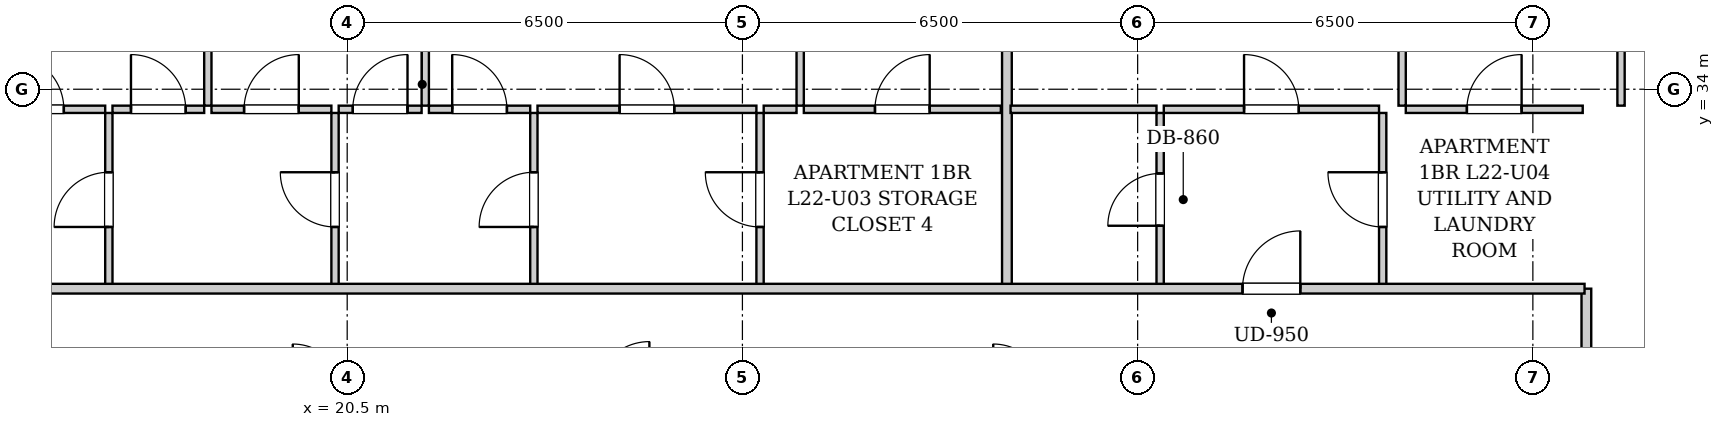
"""IFC4 building model, lengths in metres.
Left out: names, types, materials, properties, quantities, classifications, styles, units other than length and angle.
Written with IfcOpenShell. Run it as: python <this file> out.ifc"""

import sys

from ifc_helpers import new_model, si_unit, direction, frame, frame_2d, origin, place, context, subcontext, project, spatial, rectangle, extrude, element, fill, save


model = new_model("IFC4")
c1 = context("Model", 3, precision=1e-05, world=origin(), true_north=direction((0.0, 1.0)))
c2 = subcontext(c1, "Body", "Model", "MODEL_VIEW")
j1 = project(units=[si_unit("LENGTHUNIT", "METRE"), si_unit("PLANEANGLEUNIT", "RADIAN")], contexts=[c1])
p1 = place(None, origin())
s1 = spatial("IfcSite", under=j1, at=p1, CompositionType="ELEMENT")
p2 = place(p1, origin())
s2 = spatial("IfcBuilding", under=s1, at=p2, CompositionType="ELEMENT")
p3 = place(p2, frame((0.0, 0.0, 81.5)))
s3 = spatial("IfcBuildingStorey", under=s2, at=p3, CompositionType="ELEMENT", Elevation=81.5)
p4 = place(p3, frame((40.88, 28.98, 0.0), z_axis=(0.0, 0.0, 1.0), x_axis=(0.0, 1.0, 0.0)))
e1 = element("IfcWall", 1, at=p4, inside=s3, PredefinedType="PARTITIONING", context=c2, shape_type="SweptSolid", body=[
    extrude(rectangle(XDim=1.74, YDim=0.16, at=frame_2d((0.87, 0.0))), origin(), (0.0, 0.0, 1.0), 2.94),
])
p5 = place(p3, frame((16.58, 30.76, 0.0), z_axis=(0.0, 0.0, 1.0), x_axis=(0.0, 1.0, 0.0)))
e2 = element("IfcWall", 2, at=p5, inside=s3, PredefinedType="PARTITIONING", context=c2, shape_type="SweptSolid", body=[
    extrude(rectangle(XDim=2.85, YDim=0.12, at=frame_2d((1.425, 0.0))), origin(), (0.0, 0.0, 1.0), 2.94),
])
p6 = place(p5, frame((0.975, 0.0, 0.0)))
e3 = element("IfcOpeningElement", 3, at=p6, cuts=e2, PredefinedType="OPENING", context=c2, shape_type="SweptSolid", body=[
    extrude(rectangle(XDim=0.9, YDim=2.05, at=frame_2d((0.45, 1.025))), frame((0.0, 0.07, 0.0), z_axis=(0.0, -1.0, 0.0), x_axis=(1.0, 0.0, 0.0)), (0.0, 0.0, 1.0), 0.14),
])
p7 = place(p3, frame((14.26, 33.67, 0.0), z_axis=(0.0, 0.0, 1.0), x_axis=(1.0, 0.0, 0.0)))
e4 = element("IfcWall", 4, at=p7, inside=s3, PredefinedType="PARTITIONING", context=c2, shape_type="SweptSolid", body=[
    extrude(rectangle(XDim=2.26, YDim=0.12, at=frame_2d((1.13, 0.0))), origin(), (0.0, 0.0, 1.0), 2.94),
])
p8 = place(p7, frame((0.68, 0.0, 0.0)))
e5 = element("IfcOpeningElement", 5, at=p8, cuts=e4, PredefinedType="OPENING", context=c2, shape_type="SweptSolid", body=[
    extrude(rectangle(XDim=0.9, YDim=2.05, at=frame_2d((0.45, 1.025))), frame((0.0, 0.07, 0.0), z_axis=(0.0, -1.0, 0.0), x_axis=(1.0, 0.0, 0.0)), (0.0, 0.0, 1.0), 0.14),
])
p9 = place(p3, frame((20.3, 30.76, 0.0), z_axis=(0.0, 0.0, 1.0), x_axis=(0.0, 1.0, 0.0)))
e6 = element("IfcWall", 6, at=p9, inside=s3, PredefinedType="PARTITIONING", context=c2, shape_type="SweptSolid", body=[
    extrude(rectangle(XDim=2.85, YDim=0.12, at=frame_2d((1.425, 0.0))), origin(), (0.0, 0.0, 1.0), 2.94),
])
p10 = place(p9, frame((0.975, 0.0, 0.0)))
e7 = element("IfcOpeningElement", 7, at=p10, cuts=e6, PredefinedType="OPENING", context=c2, shape_type="SweptSolid", body=[
    extrude(rectangle(XDim=0.9, YDim=2.05, at=frame_2d((0.45, 1.025))), frame((0.0, 0.07, 0.0), z_axis=(0.0, -1.0, 0.0), x_axis=(1.0, 0.0, 0.0)), (0.0, 0.0, 1.0), 0.14),
])
p11 = place(p3, frame((16.64, 33.67, 0.0), z_axis=(0.0, 0.0, 1.0), x_axis=(1.0, 0.0, 0.0)))
e8 = element("IfcWall", 8, at=p11, inside=s3, PredefinedType="PARTITIONING", context=c2, shape_type="SweptSolid", body=[
    extrude(rectangle(XDim=1.508, YDim=0.12, at=frame_2d((0.754, 0.0))), origin(), (0.0, 0.0, 1.0), 2.94),
])
p12 = place(p11, frame((0.304, 0.0, 0.0)))
e9 = element("IfcOpeningElement", 9, at=p12, cuts=e8, PredefinedType="OPENING", context=c2, shape_type="SweptSolid", body=[
    extrude(rectangle(XDim=0.9, YDim=2.05, at=frame_2d((0.45, 1.025))), frame((0.0, 0.07, 0.0), z_axis=(0.0, -1.0, 0.0), x_axis=(1.0, 0.0, 0.0)), (0.0, 0.0, 1.0), 0.14),
])
p13 = place(p3, frame((18.268, 33.67, 0.0), z_axis=(0.0, 0.0, 1.0), x_axis=(1.0, 0.0, 0.0)))
e10 = element("IfcWall", 10, at=p13, inside=s3, PredefinedType="PARTITIONING", context=c2, shape_type="SweptSolid", body=[
    extrude(rectangle(XDim=1.972, YDim=0.12, at=frame_2d((0.986, 0.0))), origin(), (0.0, 0.0, 1.0), 2.94),
])
p14 = place(p13, frame((0.536, 0.0, 0.0)))
e11 = element("IfcOpeningElement", 11, at=p14, cuts=e10, PredefinedType="OPENING", context=c2, shape_type="SweptSolid", body=[
    extrude(rectangle(XDim=0.9, YDim=2.05, at=frame_2d((0.45, 1.025))), frame((0.0, 0.07, 0.0), z_axis=(0.0, -1.0, 0.0), x_axis=(1.0, 0.0, 0.0)), (0.0, 0.0, 1.0), 0.14),
])
p15 = place(p3, frame((23.57, 30.76, 0.0), z_axis=(0.0, 0.0, 1.0), x_axis=(0.0, 1.0, 0.0)))
e12 = element("IfcWall", 12, at=p15, inside=s3, PredefinedType="PARTITIONING", context=c2, shape_type="SweptSolid", body=[
    extrude(rectangle(XDim=2.85, YDim=0.12, at=frame_2d((1.425, 0.0))), origin(), (0.0, 0.0, 1.0), 2.94),
])
p16 = place(p15, frame((0.975, 0.0, 0.0)))
e13 = element("IfcOpeningElement", 13, at=p16, cuts=e12, PredefinedType="OPENING", context=c2, shape_type="SweptSolid", body=[
    extrude(rectangle(XDim=0.9, YDim=2.05, at=frame_2d((0.45, 1.025))), frame((0.0, 0.07, 0.0), z_axis=(0.0, -1.0, 0.0), x_axis=(1.0, 0.0, 0.0)), (0.0, 0.0, 1.0), 0.14),
])
p17 = place(p3, frame((20.36, 33.67, 0.0), z_axis=(0.0, 0.0, 1.0), x_axis=(1.0, 0.0, 0.0)))
e14 = element("IfcWall", 14, at=p17, inside=s3, PredefinedType="PARTITIONING", context=c2, shape_type="SweptSolid", body=[
    extrude(rectangle(XDim=1.364, YDim=0.12, at=frame_2d((0.682, 0.0))), origin(), (0.0, 0.0, 1.0), 2.94),
])
p18 = place(p17, frame((0.232, 0.0, 0.0)))
e15 = element("IfcOpeningElement", 15, at=p18, cuts=e14, PredefinedType="OPENING", context=c2, shape_type="SweptSolid", body=[
    extrude(rectangle(XDim=0.9, YDim=2.05, at=frame_2d((0.45, 1.025))), frame((0.0, 0.07, 0.0), z_axis=(0.0, -1.0, 0.0), x_axis=(1.0, 0.0, 0.0)), (0.0, 0.0, 1.0), 0.14),
])
p19 = place(p3, frame((21.844, 33.67, 0.0), z_axis=(0.0, 0.0, 1.0), x_axis=(1.0, 0.0, 0.0)))
e16 = element("IfcWall", 16, at=p19, inside=s3, PredefinedType="PARTITIONING", context=c2, shape_type="SweptSolid", body=[
    extrude(rectangle(XDim=1.666, YDim=0.12, at=frame_2d((0.833, 0.0))), origin(), (0.0, 0.0, 1.0), 2.94),
])
p20 = place(p19, frame((0.383, 0.0, 0.0)))
e17 = element("IfcOpeningElement", 17, at=p20, cuts=e16, PredefinedType="OPENING", context=c2, shape_type="SweptSolid", body=[
    extrude(rectangle(XDim=0.9, YDim=2.05, at=frame_2d((0.45, 1.025))), frame((0.0, 0.07, 0.0), z_axis=(0.0, -1.0, 0.0), x_axis=(1.0, 0.0, 0.0)), (0.0, 0.0, 1.0), 0.14),
])
p21 = place(p3, frame((27.29, 30.76, 0.0), z_axis=(0.0, 0.0, 1.0), x_axis=(0.0, 1.0, 0.0)))
e18 = element("IfcWall", 18, at=p21, inside=s3, PredefinedType="PARTITIONING", context=c2, shape_type="SweptSolid", body=[
    extrude(rectangle(XDim=2.85, YDim=0.12, at=frame_2d((1.425, 0.0))), origin(), (0.0, 0.0, 1.0), 2.94),
])
p22 = place(p21, frame((0.975, 0.0, 0.0)))
e19 = element("IfcOpeningElement", 19, at=p22, cuts=e18, PredefinedType="OPENING", context=c2, shape_type="SweptSolid", body=[
    extrude(rectangle(XDim=0.9, YDim=2.05, at=frame_2d((0.45, 1.025))), frame((0.0, 0.07, 0.0), z_axis=(0.0, -1.0, 0.0), x_axis=(1.0, 0.0, 0.0)), (0.0, 0.0, 1.0), 0.14),
])
p23 = place(p3, frame((23.63, 33.67, 0.0), z_axis=(0.0, 0.0, 1.0), x_axis=(1.0, 0.0, 0.0)))
e20 = element("IfcWall", 20, at=p23, inside=s3, PredefinedType="PARTITIONING", context=c2, shape_type="SweptSolid", body=[
    extrude(rectangle(XDim=3.6, YDim=0.12, at=frame_2d((1.8, 0.0))), origin(), (0.0, 0.0, 1.0), 2.94),
])
p24 = place(p23, frame((1.35, 0.0, 0.0)))
e21 = element("IfcOpeningElement", 21, at=p24, cuts=e20, PredefinedType="OPENING", context=c2, shape_type="SweptSolid", body=[
    extrude(rectangle(XDim=0.9, YDim=2.05, at=frame_2d((0.45, 1.025))), frame((0.0, 0.07, 0.0), z_axis=(0.0, -1.0, 0.0), x_axis=(1.0, 0.0, 0.0)), (0.0, 0.0, 1.0), 0.14),
])
p25 = place(p3, frame((27.35, 33.67, 0.0), z_axis=(0.0, 0.0, 1.0), x_axis=(1.0, 0.0, 0.0)))
e22 = element("IfcWall", 22, at=p25, inside=s3, PredefinedType="PARTITIONING", context=c2, shape_type="SweptSolid", body=[
    extrude(rectangle(XDim=0.54, YDim=0.12, at=frame_2d((0.27, 0.0))), origin(), (0.0, 0.0, 1.0), 2.94),
])
p26 = place(p3, frame((28.01, 33.67, 0.0), z_axis=(0.0, 0.0, 1.0), x_axis=(1.0, 0.0, 0.0)))
e23 = element("IfcWall", 23, at=p26, inside=s3, PredefinedType="PARTITIONING", context=c2, shape_type="SweptSolid", body=[
    extrude(rectangle(XDim=3.24, YDim=0.12, at=frame_2d((1.62, 0.0))), origin(), (0.0, 0.0, 1.0), 2.94),
])
p27 = place(p26, frame((1.17, 0.0, 0.0)))
e24 = element("IfcOpeningElement", 24, at=p27, cuts=e23, PredefinedType="OPENING", context=c2, shape_type="SweptSolid", body=[
    extrude(rectangle(XDim=0.9, YDim=2.05, at=frame_2d((0.45, 1.025))), frame((0.0, 0.07, 0.0), z_axis=(0.0, -1.0, 0.0), x_axis=(1.0, 0.0, 0.0)), (0.0, 0.0, 1.0), 0.14),
])
p28 = place(p3, frame((18.208, 33.73, 0.0), z_axis=(0.0, 0.0, 1.0), x_axis=(0.0, 1.0, 0.0)))
e25 = element("IfcWall", 25, at=p28, inside=s3, PredefinedType="PARTITIONING", context=c2, shape_type="SweptSolid", body=[
    extrude(rectangle(XDim=9.29, YDim=0.12, at=frame_2d((4.645, 0.0))), origin(), (0.0, 0.0, 1.0), 2.94),
])
p29 = place(p28, frame((4.18, 0.0, 0.0)))
e26 = element("IfcOpeningElement", 26, at=p29, cuts=e25, PredefinedType="OPENING", context=c2, shape_type="SweptSolid", body=[
    extrude(rectangle(XDim=0.9, YDim=2.05, at=frame_2d((0.45, 1.025))), frame((0.0, 0.07, 0.0), z_axis=(0.0, -1.0, 0.0), x_axis=(1.0, 0.0, 0.0)), (0.0, 0.0, 1.0), 0.14),
])
p30 = place(p3, frame((21.784, 33.73, 0.0), z_axis=(0.0, 0.0, 1.0), x_axis=(0.0, 1.0, 0.0)))
e27 = element("IfcWall", 27, at=p30, inside=s3, PredefinedType="PARTITIONING", context=c2, shape_type="SweptSolid", body=[
    extrude(rectangle(XDim=9.29, YDim=0.12, at=frame_2d((4.645, 0.0))), origin(), (0.0, 0.0, 1.0), 2.94),
])
p31 = place(p30, frame((4.18, 0.0, 0.0)))
e28 = element("IfcOpeningElement", 28, at=p31, cuts=e27, PredefinedType="OPENING", context=c2, shape_type="SweptSolid", body=[
    extrude(rectangle(XDim=0.9, YDim=2.05, at=frame_2d((0.45, 1.025))), frame((0.0, 0.07, 0.0), z_axis=(0.0, -1.0, 0.0), x_axis=(1.0, 0.0, 0.0)), (0.0, 0.0, 1.0), 0.14),
])
p32 = place(p3, frame((27.95, 33.73, 0.0), z_axis=(0.0, 0.0, 1.0), x_axis=(0.0, 1.0, 0.0)))
e29 = element("IfcWall", 29, at=p32, inside=s3, PredefinedType="PARTITIONING", context=c2, shape_type="SweptSolid", body=[
    extrude(rectangle(XDim=9.29, YDim=0.12, at=frame_2d((4.645, 0.0))), origin(), (0.0, 0.0, 1.0), 2.94),
])
p33 = place(p32, frame((4.18, 0.0, 0.0)))
e30 = element("IfcOpeningElement", 30, at=p33, cuts=e29, PredefinedType="OPENING", context=c2, shape_type="SweptSolid", body=[
    extrude(rectangle(XDim=0.9, YDim=2.05, at=frame_2d((0.45, 1.025))), frame((0.0, 0.07, 0.0), z_axis=(0.0, -1.0, 0.0), x_axis=(1.0, 0.0, 0.0)), (0.0, 0.0, 1.0), 0.14),
])
p34 = place(p3, frame((31.35, 30.76, 0.0), z_axis=(0.0, 0.0, 1.0), x_axis=(0.0, 1.0, 0.0)))
e31 = element("IfcWall", 31, at=p34, inside=s3, PredefinedType="PARTITIONING", context=c2, shape_type="SweptSolid", body=[
    extrude(rectangle(XDim=12.26, YDim=0.16, at=frame_2d((6.13, 0.0))), origin(), (0.0, 0.0, 1.0), 2.94),
])
p35 = place(p3, frame((33.87, 30.76, 0.0), z_axis=(0.0, 0.0, 1.0), x_axis=(0.0, 1.0, 0.0)))
e32 = element("IfcWall", 32, at=p35, inside=s3, PredefinedType="PARTITIONING", context=c2, shape_type="SweptSolid", body=[
    extrude(rectangle(XDim=2.85, YDim=0.12, at=frame_2d((1.425, 0.0))), origin(), (0.0, 0.0, 1.0), 2.94),
])
p36 = place(p35, frame((0.995, 0.0, 0.0)))
e33 = element("IfcOpeningElement", 33, at=p36, cuts=e32, PredefinedType="OPENING", context=c2, shape_type="SweptSolid", body=[
    extrude(rectangle(XDim=0.86, YDim=2.05, at=frame_2d((0.43, 1.025))), frame((0.0, 0.07, 0.0), z_axis=(0.0, -1.0, 0.0), x_axis=(1.0, 0.0, 0.0)), (0.0, 0.0, 1.0), 0.14),
])
p37 = place(p3, frame((31.41, 33.67, 0.0), z_axis=(0.0, 0.0, 1.0), x_axis=(1.0, 0.0, 0.0)))
e34 = element("IfcWall", 34, at=p37, inside=s3, PredefinedType="PARTITIONING", context=c2, shape_type="SweptSolid", body=[
    extrude(rectangle(XDim=2.4, YDim=0.12, at=frame_2d((1.2, 0.0))), origin(), (0.0, 0.0, 1.0), 2.94),
])
p38 = place(p3, frame((37.53, 30.76, 0.0), z_axis=(0.0, 0.0, 1.0), x_axis=(0.0, 1.0, 0.0)))
e35 = element("IfcWall", 35, at=p38, inside=s3, PredefinedType="PARTITIONING", context=c2, shape_type="SweptSolid", body=[
    extrude(rectangle(XDim=2.85, YDim=0.12, at=frame_2d((1.425, 0.0))), origin(), (0.0, 0.0, 1.0), 2.94),
])
p39 = place(p38, frame((0.975, 0.0, 0.0)))
e36 = element("IfcOpeningElement", 36, at=p39, cuts=e35, PredefinedType="OPENING", context=c2, shape_type="SweptSolid", body=[
    extrude(rectangle(XDim=0.9, YDim=2.05, at=frame_2d((0.45, 1.025))), frame((0.0, 0.07, 0.0), z_axis=(0.0, -1.0, 0.0), x_axis=(1.0, 0.0, 0.0)), (0.0, 0.0, 1.0), 0.14),
])
p40 = place(p3, frame((33.93, 33.67, 0.0), z_axis=(0.0, 0.0, 1.0), x_axis=(1.0, 0.0, 0.0)))
e37 = element("IfcWall", 37, at=p40, inside=s3, PredefinedType="PARTITIONING", context=c2, shape_type="SweptSolid", body=[
    extrude(rectangle(XDim=3.54, YDim=0.12, at=frame_2d((1.77, 0.0))), origin(), (0.0, 0.0, 1.0), 2.94),
])
p41 = place(p40, frame((1.32, 0.0, 0.0)))
e38 = element("IfcOpeningElement", 38, at=p41, cuts=e37, PredefinedType="OPENING", context=c2, shape_type="SweptSolid", body=[
    extrude(rectangle(XDim=0.9, YDim=2.05, at=frame_2d((0.45, 1.025))), frame((0.0, 0.07, 0.0), z_axis=(0.0, -1.0, 0.0), x_axis=(1.0, 0.0, 0.0)), (0.0, 0.0, 1.0), 0.14),
])
p42 = place(p3, frame((37.91, 33.67, 0.0), z_axis=(0.0, 0.0, 1.0), x_axis=(1.0, 0.0, 0.0)))
e39 = element("IfcWall", 39, at=p42, inside=s3, PredefinedType="PARTITIONING", context=c2, shape_type="SweptSolid", body=[
    extrude(rectangle(XDim=2.91, YDim=0.12, at=frame_2d((1.455, 0.0))), origin(), (0.0, 0.0, 1.0), 2.94),
])
p43 = place(p42, frame((1.005, 0.0, 0.0)))
e40 = element("IfcOpeningElement", 40, at=p43, cuts=e39, PredefinedType="OPENING", context=c2, shape_type="SweptSolid", body=[
    extrude(rectangle(XDim=0.9, YDim=2.05, at=frame_2d((0.45, 1.025))), frame((0.0, 0.07, 0.0), z_axis=(0.0, -1.0, 0.0), x_axis=(1.0, 0.0, 0.0)), (0.0, 0.0, 1.0), 0.14),
])
p44 = place(p3, frame((37.85, 33.73, 0.0), z_axis=(0.0, 0.0, 1.0), x_axis=(0.0, 1.0, 0.0)))
e41 = element("IfcWall", 41, at=p44, inside=s3, PredefinedType="PARTITIONING", context=c2, shape_type="SweptSolid", body=[
    extrude(rectangle(XDim=7.14, YDim=0.12, at=frame_2d((3.57, 0.0))), origin(), (0.0, 0.0, 1.0), 2.94),
])
p45 = place(p44, frame((3.12, 0.0, 0.0)))
e42 = element("IfcOpeningElement", 42, at=p45, cuts=e41, PredefinedType="OPENING", context=c2, shape_type="SweptSolid", body=[
    extrude(rectangle(XDim=0.9, YDim=2.05, at=frame_2d((0.45, 1.025))), frame((0.0, 0.07, 0.0), z_axis=(0.0, -1.0, 0.0), x_axis=(1.0, 0.0, 0.0)), (0.0, 0.0, 1.0), 0.14),
])
p46 = place(p3, frame((41.45, 33.73, 0.0), z_axis=(0.0, 0.0, 1.0), x_axis=(0.0, 1.0, 0.0)))
e43 = element("IfcWall", 43, at=p46, inside=s3, PredefinedType="PARTITIONING", context=c2, shape_type="SweptSolid", body=[
    extrude(rectangle(XDim=7.14, YDim=0.12, at=frame_2d((3.57, 0.0))), origin(), (0.0, 0.0, 1.0), 2.94),
])
p47 = place(p46, frame((3.075, 0.0, 0.0)))
e44 = element("IfcOpeningElement", 44, at=p47, cuts=e43, PredefinedType="OPENING", context=c2, shape_type="SweptSolid", body=[
    extrude(rectangle(XDim=0.9, YDim=2.05, at=frame_2d((0.45, 1.025))), frame((0.0, 0.07, 0.0), z_axis=(0.0, -1.0, 0.0), x_axis=(1.0, 0.0, 0.0)), (0.0, 0.0, 1.0), 0.14),
])
p48 = place(p3, frame((10.05, 30.72, 0.0), z_axis=(0.0, 0.0, 1.0), x_axis=(1.0, 0.0, 0.0)))
e45 = element("IfcWall", 45, at=p48, inside=s3, PredefinedType="PARTITIONING", context=c2, shape_type="SweptSolid", body=[
    extrude(rectangle(XDim=30.8, YDim=0.16, at=frame_2d((15.4, 0.0))), origin(), (0.0, 0.0, 1.0), 2.94),
])
p49 = place(p48, frame((4.035, 0.0, 0.0)))
e46 = element("IfcOpeningElement", 46, at=p49, cuts=e45, PredefinedType="OPENING", context=c2, shape_type="SweptSolid", body=[
    extrude(rectangle(XDim=0.95, YDim=2.1, at=frame_2d((0.475, 1.05))), frame((0.0, 0.09, 0.0), z_axis=(0.0, -1.0, 0.0), x_axis=(1.0, 0.0, 0.0)), (0.0, 0.0, 1.0), 0.18),
])
p50 = place(p48, frame((25.175, 0.0, 0.0)))
e47 = element("IfcOpeningElement", 47, at=p50, cuts=e45, PredefinedType="OPENING", context=c2, shape_type="SweptSolid", body=[
    extrude(rectangle(XDim=0.95, YDim=2.1, at=frame_2d((0.475, 1.05))), frame((0.0, 0.09, 0.0), z_axis=(0.0, -1.0, 0.0), x_axis=(1.0, 0.0, 0.0)), (0.0, 0.0, 1.0), 0.18),
])
p51 = place(p6, origin())
e48 = element("IfcDoor", 48, at=p51, inside=s3, OperationType="SINGLE_SWING_LEFT", PredefinedType="DOOR", context=c2, shape_type="SweptSolid", body=[
    extrude(rectangle(XDim=0.9, YDim=2.05, at=frame_2d((0.45, 1.025))), frame((0.0, 0.025, 0.0), z_axis=(0.0, -1.0, 0.0), x_axis=(1.0, 0.0, 0.0)), (0.0, 0.0, 1.0), 0.05),
])
fill(e3, e48)
p52 = place(p8, origin())
e49 = element("IfcDoor", 49, at=p52, inside=s3, OperationType="SINGLE_SWING_LEFT", PredefinedType="DOOR", context=c2, shape_type="SweptSolid", body=[
    extrude(rectangle(XDim=0.9, YDim=2.05, at=frame_2d((0.45, 1.025))), frame((0.0, 0.025, 0.0), z_axis=(0.0, -1.0, 0.0), x_axis=(1.0, 0.0, 0.0)), (0.0, 0.0, 1.0), 0.05),
])
fill(e5, e49)
p53 = place(p10, origin())
e50 = element("IfcDoor", 50, at=p53, inside=s3, OperationType="SINGLE_SWING_RIGHT", PredefinedType="DOOR", context=c2, shape_type="SweptSolid", body=[
    extrude(rectangle(XDim=0.9, YDim=2.05, at=frame_2d((0.45, 1.025))), frame((0.0, 0.025, 0.0), z_axis=(0.0, -1.0, 0.0), x_axis=(1.0, 0.0, 0.0)), (0.0, 0.0, 1.0), 0.05),
])
fill(e7, e50)
p54 = place(p12, origin())
e51 = element("IfcDoor", 51, at=p54, inside=s3, OperationType="SINGLE_SWING_LEFT", PredefinedType="DOOR", context=c2, shape_type="SweptSolid", body=[
    extrude(rectangle(XDim=0.9, YDim=2.05, at=frame_2d((0.45, 1.025))), frame((0.0, 0.025, 0.0), z_axis=(0.0, -1.0, 0.0), x_axis=(1.0, 0.0, 0.0)), (0.0, 0.0, 1.0), 0.05),
])
fill(e9, e51)
p55 = place(p14, origin())
e52 = element("IfcDoor", 52, at=p55, inside=s3, OperationType="SINGLE_SWING_RIGHT", PredefinedType="DOOR", context=c2, shape_type="SweptSolid", body=[
    extrude(rectangle(XDim=0.9, YDim=2.05, at=frame_2d((0.45, 1.025))), frame((0.0, 0.025, 0.0), z_axis=(0.0, -1.0, 0.0), x_axis=(1.0, 0.0, 0.0)), (0.0, 0.0, 1.0), 0.05),
])
fill(e11, e52)
p56 = place(p16, origin())
e53 = element("IfcDoor", 53, at=p56, inside=s3, OperationType="SINGLE_SWING_LEFT", PredefinedType="DOOR", context=c2, shape_type="SweptSolid", body=[
    extrude(rectangle(XDim=0.9, YDim=2.05, at=frame_2d((0.45, 1.025))), frame((0.0, 0.025, 0.0), z_axis=(0.0, -1.0, 0.0), x_axis=(1.0, 0.0, 0.0)), (0.0, 0.0, 1.0), 0.05),
])
fill(e13, e53)
p57 = place(p18, origin())
e54 = element("IfcDoor", 54, at=p57, inside=s3, OperationType="SINGLE_SWING_RIGHT", PredefinedType="DOOR", context=c2, shape_type="SweptSolid", body=[
    extrude(rectangle(XDim=0.9, YDim=2.05, at=frame_2d((0.45, 1.025))), frame((0.0, 0.025, 0.0), z_axis=(0.0, -1.0, 0.0), x_axis=(1.0, 0.0, 0.0)), (0.0, 0.0, 1.0), 0.05),
])
fill(e15, e54)
p58 = place(p20, origin())
e55 = element("IfcDoor", 55, at=p58, inside=s3, OperationType="SINGLE_SWING_LEFT", PredefinedType="DOOR", context=c2, shape_type="SweptSolid", body=[
    extrude(rectangle(XDim=0.9, YDim=2.05, at=frame_2d((0.45, 1.025))), frame((0.0, 0.025, 0.0), z_axis=(0.0, -1.0, 0.0), x_axis=(1.0, 0.0, 0.0)), (0.0, 0.0, 1.0), 0.05),
])
fill(e17, e55)
p59 = place(p22, origin())
e56 = element("IfcDoor", 56, at=p59, inside=s3, OperationType="SINGLE_SWING_RIGHT", PredefinedType="DOOR", context=c2, shape_type="SweptSolid", body=[
    extrude(rectangle(XDim=0.9, YDim=2.05, at=frame_2d((0.45, 1.025))), frame((0.0, 0.025, 0.0), z_axis=(0.0, -1.0, 0.0), x_axis=(1.0, 0.0, 0.0)), (0.0, 0.0, 1.0), 0.05),
])
fill(e19, e56)
p60 = place(p24, origin())
e57 = element("IfcDoor", 57, at=p60, inside=s3, OperationType="SINGLE_SWING_LEFT", PredefinedType="DOOR", context=c2, shape_type="SweptSolid", body=[
    extrude(rectangle(XDim=0.9, YDim=2.05, at=frame_2d((0.45, 1.025))), frame((0.0, 0.025, 0.0), z_axis=(0.0, -1.0, 0.0), x_axis=(1.0, 0.0, 0.0)), (0.0, 0.0, 1.0), 0.05),
])
fill(e21, e57)
p61 = place(p27, origin())
e58 = element("IfcDoor", 58, at=p61, inside=s3, OperationType="SINGLE_SWING_RIGHT", PredefinedType="DOOR", context=c2, shape_type="SweptSolid", body=[
    extrude(rectangle(XDim=0.9, YDim=2.05, at=frame_2d((0.45, 1.025))), frame((0.0, 0.025, 0.0), z_axis=(0.0, -1.0, 0.0), x_axis=(1.0, 0.0, 0.0)), (0.0, 0.0, 1.0), 0.05),
])
fill(e24, e58)
p62 = place(p36, origin())
e59 = element("IfcDoor", 59, at=p62, inside=s3, OperationType="SINGLE_SWING_LEFT", PredefinedType="DOOR", context=c2, shape_type="SweptSolid", body=[
    extrude(rectangle(XDim=0.86, YDim=2.05, at=frame_2d((0.43, 1.025))), frame((0.0, 0.025, 0.0), z_axis=(0.0, -1.0, 0.0), x_axis=(1.0, 0.0, 0.0)), (0.0, 0.0, 1.0), 0.05),
])
fill(e33, e59)
p63 = place(p39, origin())
e60 = element("IfcDoor", 60, at=p63, inside=s3, OperationType="SINGLE_SWING_RIGHT", PredefinedType="DOOR", context=c2, shape_type="SweptSolid", body=[
    extrude(rectangle(XDim=0.9, YDim=2.05, at=frame_2d((0.45, 1.025))), frame((0.0, 0.025, 0.0), z_axis=(0.0, -1.0, 0.0), x_axis=(1.0, 0.0, 0.0)), (0.0, 0.0, 1.0), 0.05),
])
fill(e36, e60)
p64 = place(p41, origin())
e61 = element("IfcDoor", 61, at=p64, inside=s3, OperationType="SINGLE_SWING_LEFT", PredefinedType="DOOR", context=c2, shape_type="SweptSolid", body=[
    extrude(rectangle(XDim=0.9, YDim=2.05, at=frame_2d((0.45, 1.025))), frame((0.0, 0.025, 0.0), z_axis=(0.0, -1.0, 0.0), x_axis=(1.0, 0.0, 0.0)), (0.0, 0.0, 1.0), 0.05),
])
fill(e38, e61)
p65 = place(p43, origin())
e62 = element("IfcDoor", 62, at=p65, inside=s3, OperationType="SINGLE_SWING_RIGHT", PredefinedType="DOOR", context=c2, shape_type="SweptSolid", body=[
    extrude(rectangle(XDim=0.9, YDim=2.05, at=frame_2d((0.45, 1.025))), frame((0.0, 0.025, 0.0), z_axis=(0.0, -1.0, 0.0), x_axis=(1.0, 0.0, 0.0)), (0.0, 0.0, 1.0), 0.05),
])
fill(e40, e62)
p66 = place(p50, origin())
e63 = element("IfcDoor", 63, at=p66, inside=s3, OperationType="SINGLE_SWING_RIGHT", PredefinedType="DOOR", context=c2, shape_type="SweptSolid", body=[
    extrude(rectangle(XDim=0.95, YDim=2.1, at=frame_2d((0.475, 1.05))), frame((0.0, 0.025, 0.0), z_axis=(0.0, -1.0, 0.0), x_axis=(1.0, 0.0, 0.0)), (0.0, 0.0, 1.0), 0.05),
])
fill(e47, e63)
save(model, sys.argv[1])
